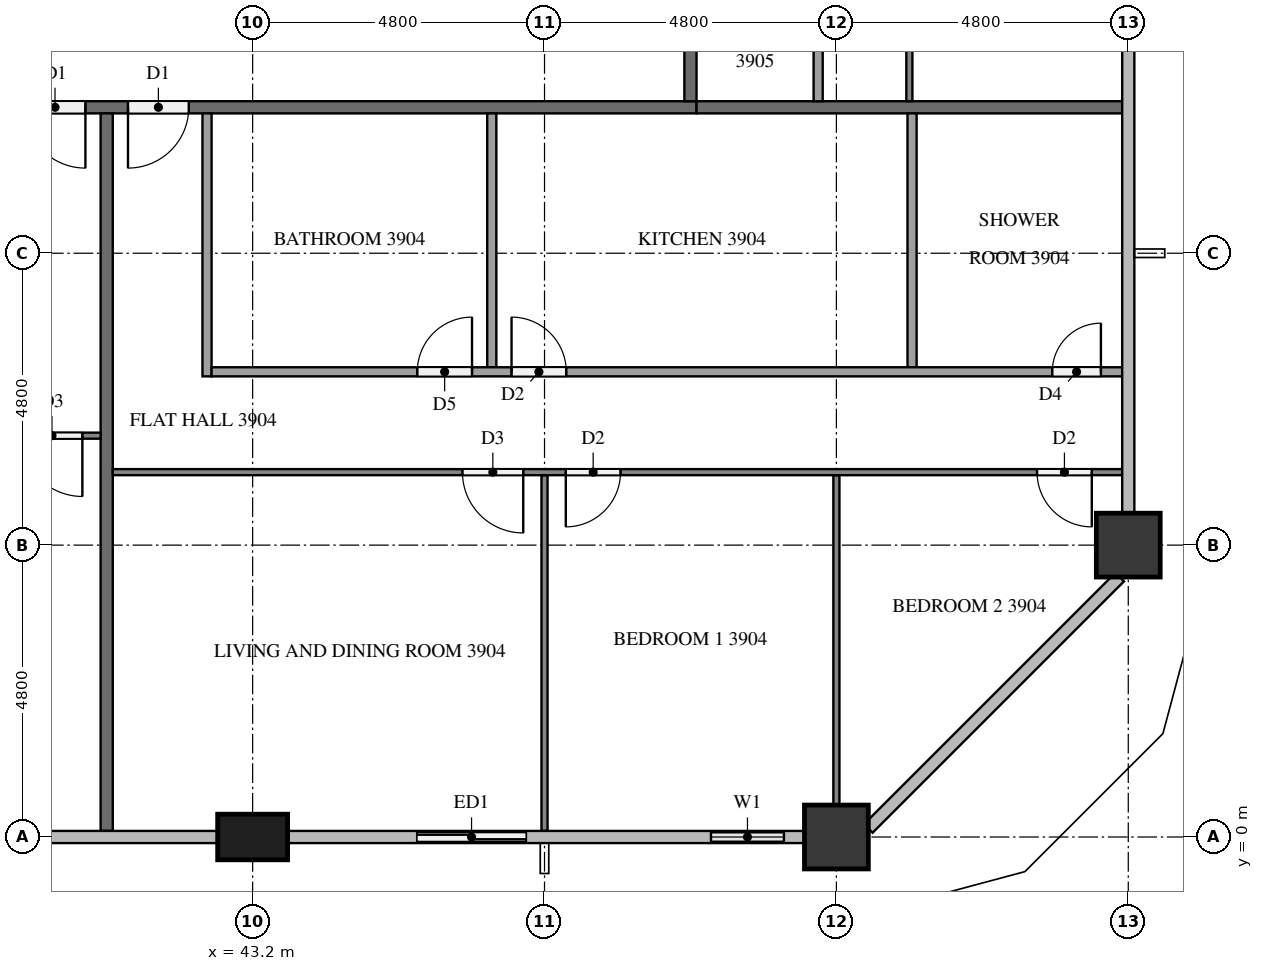
"""IFC4 building model, lengths in metres.
Left out: names, types, materials, properties, quantities, classifications, styles, units other than length and angle.
Written with IfcOpenShell. Run it as: python <this file> out.ifc"""

import sys

from ifc_helpers import new_model, si_unit, direction, frame, frame_2d, origin, origin_2d, place, context, subcontext, project, spatial, rectangle, extrude, element, fill, save


model = new_model("IFC4")
c1 = context("Model", 3, precision=1e-05, world=origin(), true_north=direction((0.0, 1.0)))
c2 = subcontext(c1, "Body", "Model", "MODEL_VIEW")
j1 = project(units=[si_unit("LENGTHUNIT", "METRE"), si_unit("PLANEANGLEUNIT", "RADIAN")], contexts=[c1])
p1 = place(None, origin())
s1 = spatial("IfcSite", under=j1, at=p1, CompositionType="ELEMENT")
p2 = place(p1, origin())
s2 = spatial("IfcBuilding", under=s1, at=p2, CompositionType="ELEMENT")
p3 = place(p2, frame((0.0, 0.0, 152.5)))
s3 = spatial("IfcBuildingStorey", under=s2, at=p3, CompositionType="ELEMENT", Elevation=152.5)
p4 = place(p3, frame((43.2, 0.0, 0.0), z_axis=(0.0, 0.0, 1.0), x_axis=(1.0, 0.0, 0.0)))
e1 = element("IfcColumn", 1, at=p4, inside=s3, PredefinedType="COLUMN", context=c2, shape_type="SweptSolid", body=[
    extrude(rectangle(XDim=1.15, YDim=0.75, at=origin_2d()), origin(), (0.0, 0.0, 1.0), 3.2),
])
for number, where, z_axis, x_axis in (
    (2, (52.8, 0.0, 0.0), (0.0, 0.0, 1.0), (1.0, 0.0, 0.0)),
    (3, (57.6, 4.8, 0.0), (0.0, 0.0, 1.0), (1.0, 0.0, 0.0)),
):
    element("IfcColumn", number, at=place(p3, frame(where, z_axis=z_axis, x_axis=x_axis)), inside=s3, PredefinedType="COLUMN", context=c2, shape_type="SweptSolid", body=[
        extrude(rectangle(XDim=1.05, YDim=1.05, at=origin_2d()), origin(), (0.0, 0.0, 1.0), 3.2),
    ])
p5 = place(p3, frame((45.6, 0.0, 0.0), z_axis=(0.0, 0.0, 1.0), x_axis=(1.0, 0.0, 0.0)))
e4 = element("IfcWall", 4, at=p5, inside=s3, PredefinedType="SOLIDWALL", context=c2, shape_type="SweptSolid", body=[
    extrude(rectangle(XDim=2.4, YDim=0.15, at=frame_2d((1.2, 0.0))), origin(), (0.0, 0.0, 1.0), 3.2),
])
p6 = place(p5, frame((0.3, 0.0, 0.0)))
e5 = element("IfcOpeningElement", 5, at=p6, cuts=e4, PredefinedType="OPENING", context=c2, shape_type="SweptSolid", body=[
    extrude(rectangle(XDim=1.8, YDim=2.4, at=frame_2d((0.9, 1.2))), frame((0.0, 0.085, 0.0), z_axis=(0.0, -1.0, 0.0), x_axis=(1.0, 0.0, 0.0)), (0.0, 0.0, 1.0), 0.17),
])
p7 = place(p3, frame((50.4, 0.0, 0.0), z_axis=(0.0, 0.0, 1.0), x_axis=(1.0, 0.0, 0.0)))
e6 = element("IfcWall", 6, at=p7, inside=s3, PredefinedType="SOLIDWALL", context=c2, shape_type="SweptSolid", body=[
    extrude(rectangle(XDim=1.875, YDim=0.15, at=frame_2d((0.938, 0.0))), origin(), (0.0, 0.0, 1.0), 3.2),
])
p8 = place(p7, frame((0.337, 0.0, 0.9)))
e7 = element("IfcOpeningElement", 7, at=p8, cuts=e6, PredefinedType="OPENING", context=c2, shape_type="SweptSolid", body=[
    extrude(rectangle(XDim=1.2, YDim=1.4, at=frame_2d((0.6, 0.7))), frame((0.0, 0.085, 0.0), z_axis=(0.0, -1.0, 0.0), x_axis=(1.0, 0.0, 0.0)), (0.0, 0.0, 1.0), 0.17),
])
p9 = place(p3, frame((50.5, 12.0, 0.0), z_axis=(0.0, 0.0, 1.0), x_axis=(-1.0, 0.0, 0.0)))
e8 = element("IfcWall", 8, at=p9, inside=s3, PredefinedType="PARTITIONING", context=c2, shape_type="SweptSolid", body=[
    extrude(rectangle(XDim=38.6, YDim=0.2, at=frame_2d((19.3, 0.0))), origin(), (0.0, 0.0, 1.0), 3.2),
])
p10 = place(p9, frame((36.45, 0.0, 0.0)))
e9 = element("IfcOpeningElement", 9, at=p10, cuts=e8, PredefinedType="OPENING", context=c2, shape_type="SweptSolid", body=[
    extrude(rectangle(XDim=1.0, YDim=2.1, at=frame_2d((0.5, 1.05))), frame((0.0, 0.11, 0.0), z_axis=(0.0, -1.0, 0.0), x_axis=(1.0, 0.0, 0.0)), (0.0, 0.0, 1.0), 0.22),
])
p11 = place(p9, frame((34.75, 0.0, 0.0)))
e10 = element("IfcOpeningElement", 10, at=p11, cuts=e8, PredefinedType="OPENING", context=c2, shape_type="SweptSolid", body=[
    extrude(rectangle(XDim=1.0, YDim=2.1, at=frame_2d((0.5, 1.05))), frame((0.0, 0.11, 0.0), z_axis=(0.0, -1.0, 0.0), x_axis=(1.0, 0.0, 0.0)), (0.0, 0.0, 1.0), 0.22),
])
p12 = place(p9, frame((10.05, 0.0, 0.0)))
e11 = element("IfcOpeningElement", 11, at=p12, cuts=e8, PredefinedType="OPENING", context=c2, shape_type="SweptSolid", body=[
    extrude(rectangle(XDim=1.0, YDim=2.1, at=frame_2d((0.5, 1.05))), frame((0.0, 0.11, 0.0), z_axis=(0.0, -1.0, 0.0), x_axis=(1.0, 0.0, 0.0)), (0.0, 0.0, 1.0), 0.22),
])
p13 = place(p9, frame((8.35, 0.0, 0.0)))
e12 = element("IfcOpeningElement", 12, at=p13, cuts=e8, PredefinedType="OPENING", context=c2, shape_type="SweptSolid", body=[
    extrude(rectangle(XDim=1.0, YDim=2.1, at=frame_2d((0.5, 1.05))), frame((0.0, 0.11, 0.0), z_axis=(0.0, -1.0, 0.0), x_axis=(1.0, 0.0, 0.0)), (0.0, 0.0, 1.0), 0.22),
])
p14 = place(p3, frame((50.4, 40.7, 0.0), z_axis=(0.0, 0.0, 1.0), x_axis=(0.0, -1.0, 0.0)))
e13 = element("IfcWall", 13, at=p14, inside=s3, PredefinedType="PARTITIONING", context=c2, shape_type="SweptSolid", body=[
    extrude(rectangle(XDim=28.6, YDim=0.2, at=frame_2d((14.3, 0.0))), origin(), (0.0, 0.0, 1.0), 3.2),
])
p15 = place(p14, frame((17.05, 0.0, 0.0)))
e14 = element("IfcOpeningElement", 14, at=p15, cuts=e13, PredefinedType="OPENING", context=c2, shape_type="SweptSolid", body=[
    extrude(rectangle(XDim=1.0, YDim=2.1, at=frame_2d((0.5, 1.05))), frame((0.0, 0.11, 0.0), z_axis=(0.0, -1.0, 0.0), x_axis=(1.0, 0.0, 0.0)), (0.0, 0.0, 1.0), 0.22),
])
p16 = place(p14, frame((15.35, 0.0, 0.0)))
e15 = element("IfcOpeningElement", 15, at=p16, cuts=e13, PredefinedType="OPENING", context=c2, shape_type="SweptSolid", body=[
    extrude(rectangle(XDim=1.0, YDim=2.1, at=frame_2d((0.5, 1.05))), frame((0.0, 0.11, 0.0), z_axis=(0.0, -1.0, 0.0), x_axis=(1.0, 0.0, 0.0)), (0.0, 0.0, 1.0), 0.22),
])
p17 = place(p14, frame((5.75, 0.0, 0.0)))
e16 = element("IfcOpeningElement", 16, at=p17, cuts=e13, PredefinedType="OPENING", context=c2, shape_type="SweptSolid", body=[
    extrude(rectangle(XDim=1.0, YDim=2.1, at=frame_2d((0.5, 1.05))), frame((0.0, 0.11, 0.0), z_axis=(0.0, -1.0, 0.0), x_axis=(1.0, 0.0, 0.0)), (0.0, 0.0, 1.0), 0.22),
])
p18 = place(p3, frame((40.8, 11.9, 0.0), z_axis=(0.0, 0.0, 1.0), x_axis=(0.0, -1.0, 0.0)))
e17 = element("IfcWall", 17, at=p18, inside=s3, PredefinedType="PARTITIONING", context=c2, shape_type="SweptSolid", body=[
    extrude(rectangle(XDim=11.8, YDim=0.2, at=frame_2d((5.9, 0.0))), origin(), (0.0, 0.0, 1.0), 3.2),
])
p19 = place(p3, frame((50.5, 12.0, 0.0), z_axis=(0.0, 0.0, 1.0), x_axis=(1.0, 0.0, 0.0)))
e18 = element("IfcWall", 18, at=p19, inside=s3, PredefinedType="PARTITIONING", context=c2, shape_type="SweptSolid", body=[
    extrude(rectangle(XDim=7.0, YDim=0.2, at=frame_2d((3.5, 0.0))), origin(), (0.0, 0.0, 1.0), 3.2),
])
p20 = place(p3, frame((40.7, 6.6, 0.0), z_axis=(0.0, 0.0, 1.0), x_axis=(-1.0, 0.0, 0.0)))
e19 = element("IfcWall", 19, at=p20, inside=s3, PredefinedType="PARTITIONING", context=c2, shape_type="SweptSolid", body=[
    extrude(rectangle(XDim=14.2, YDim=0.1, at=frame_2d((7.1, 0.0))), origin(), (0.0, 0.0, 1.0), 3.2),
])
p21 = place(p20, frame((0.3, 0.0, 0.0)))
e20 = element("IfcOpeningElement", 20, at=p21, cuts=e19, PredefinedType="OPENING", context=c2, shape_type="SweptSolid", body=[
    extrude(rectangle(XDim=1.0, YDim=2.1, at=frame_2d((0.5, 1.05))), frame((0.0, 0.06, 0.0), z_axis=(0.0, -1.0, 0.0), x_axis=(1.0, 0.0, 0.0)), (0.0, 0.0, 1.0), 0.12),
])
p22 = place(p20, frame((8.25, 0.0, 0.0)))
e21 = element("IfcOpeningElement", 21, at=p22, cuts=e19, PredefinedType="OPENING", context=c2, shape_type="SweptSolid", body=[
    extrude(rectangle(XDim=0.9, YDim=2.1, at=frame_2d((0.45, 1.05))), frame((0.0, 0.06, 0.0), z_axis=(0.0, -1.0, 0.0), x_axis=(1.0, 0.0, 0.0)), (0.0, 0.0, 1.0), 0.12),
])
p23 = place(p20, frame((9.85, 0.0, 0.0)))
e22 = element("IfcOpeningElement", 22, at=p23, cuts=e19, PredefinedType="OPENING", context=c2, shape_type="SweptSolid", body=[
    extrude(rectangle(XDim=0.9, YDim=2.1, at=frame_2d((0.45, 1.05))), frame((0.0, 0.06, 0.0), z_axis=(0.0, -1.0, 0.0), x_axis=(1.0, 0.0, 0.0)), (0.0, 0.0, 1.0), 0.12),
])
p24 = place(p3, frame((48.0, 5.95, 0.0), z_axis=(0.0, 0.0, 1.0), x_axis=(0.0, -1.0, 0.0)))
e23 = element("IfcWall", 23, at=p24, inside=s3, PredefinedType="PARTITIONING", context=c2, shape_type="SweptSolid", body=[
    extrude(rectangle(XDim=5.85, YDim=0.1, at=frame_2d((2.925, 0.0))), origin(), (0.0, 0.0, 1.0), 3.2),
])
p25 = place(p3, frame((52.8, 5.95, 0.0), z_axis=(0.0, 0.0, 1.0), x_axis=(0.0, -1.0, 0.0)))
e24 = element("IfcWall", 24, at=p25, inside=s3, PredefinedType="PARTITIONING", context=c2, shape_type="SweptSolid", body=[
    extrude(rectangle(XDim=5.425, YDim=0.1, at=frame_2d((2.712, 0.0))), origin(), (0.0, 0.0, 1.0), 3.2),
])
p26 = place(p3, frame((57.5, 6.0, 0.0), z_axis=(0.0, 0.0, 1.0), x_axis=(-1.0, 0.0, 0.0)))
e25 = element("IfcWall", 25, at=p26, inside=s3, PredefinedType="PARTITIONING", context=c2, shape_type="SweptSolid", body=[
    extrude(rectangle(XDim=16.6, YDim=0.1, at=frame_2d((8.3, 0.0))), origin(), (0.0, 0.0, 1.0), 3.2),
])
p27 = place(p26, frame((9.85, 0.0, 0.0)))
e26 = element("IfcOpeningElement", 26, at=p27, cuts=e25, PredefinedType="OPENING", context=c2, shape_type="SweptSolid", body=[
    extrude(rectangle(XDim=1.0, YDim=2.1, at=frame_2d((0.5, 1.05))), frame((0.0, 0.06, 0.0), z_axis=(0.0, -1.0, 0.0), x_axis=(1.0, 0.0, 0.0)), (0.0, 0.0, 1.0), 0.12),
])
p28 = place(p26, frame((8.25, 0.0, 0.0)))
e27 = element("IfcOpeningElement", 27, at=p28, cuts=e25, PredefinedType="OPENING", context=c2, shape_type="SweptSolid", body=[
    extrude(rectangle(XDim=0.9, YDim=2.1, at=frame_2d((0.45, 1.05))), frame((0.0, 0.06, 0.0), z_axis=(0.0, -1.0, 0.0), x_axis=(1.0, 0.0, 0.0)), (0.0, 0.0, 1.0), 0.12),
])
p29 = place(p26, frame((0.5, 0.0, 0.0)))
e28 = element("IfcOpeningElement", 28, at=p29, cuts=e25, PredefinedType="OPENING", context=c2, shape_type="SweptSolid", body=[
    extrude(rectangle(XDim=0.9, YDim=2.1, at=frame_2d((0.45, 1.05))), frame((0.0, 0.06, 0.0), z_axis=(0.0, -1.0, 0.0), x_axis=(1.0, 0.0, 0.0)), (0.0, 0.0, 1.0), 0.12),
])
for number, where, z_axis, x_axis in (
    (29, (47.133, 11.9, 0.0), (0.0, 0.0, 1.0), (0.0, -1.0, 0.0)),
    (30, (54.044, 11.9, 0.0), (0.0, 0.0, 1.0), (0.0, -1.0, 0.0)),
):
    element("IfcWall", number, at=place(p3, frame(where, z_axis=z_axis, x_axis=x_axis)), inside=s3, PredefinedType="PARTITIONING", context=c2, shape_type="SweptSolid", body=[
        extrude(rectangle(XDim=4.175, YDim=0.15, at=frame_2d((2.087, 0.0))), origin(), (0.0, 0.0, 1.0), 3.2),
    ])
p30 = place(p3, frame((42.45, 11.9, 0.0), z_axis=(0.0, 0.0, 1.0), x_axis=(0.0, -1.0, 0.0)))
e31 = element("IfcWall", 31, at=p30, inside=s3, PredefinedType="PARTITIONING", context=c2, shape_type="SweptSolid", body=[
    extrude(rectangle(XDim=4.325, YDim=0.15, at=frame_2d((2.163, 0.0))), origin(), (0.0, 0.0, 1.0), 3.2),
])
p31 = place(p3, frame((42.525, 7.65, 0.0), z_axis=(0.0, 0.0, 1.0), x_axis=(1.0, 0.0, 0.0)))
e32 = element("IfcWall", 32, at=p31, inside=s3, PredefinedType="PARTITIONING", context=c2, shape_type="SweptSolid", body=[
    extrude(rectangle(XDim=14.975, YDim=0.15, at=frame_2d((7.488, 0.0))), origin(), (0.0, 0.0, 1.0), 3.2),
])
p32 = place(p31, frame((3.383, 0.0, 0.0)))
e33 = element("IfcOpeningElement", 33, at=p32, cuts=e32, PredefinedType="OPENING", context=c2, shape_type="SweptSolid", body=[
    extrude(rectangle(XDim=0.9, YDim=2.1, at=frame_2d((0.45, 1.05))), frame((0.0, 0.085, 0.0), z_axis=(0.0, -1.0, 0.0), x_axis=(1.0, 0.0, 0.0)), (0.0, 0.0, 1.0), 0.17),
])
p33 = place(p31, frame((4.933, 0.0, 0.0)))
e34 = element("IfcOpeningElement", 34, at=p33, cuts=e32, PredefinedType="OPENING", context=c2, shape_type="SweptSolid", body=[
    extrude(rectangle(XDim=0.9, YDim=2.1, at=frame_2d((0.45, 1.05))), frame((0.0, 0.085, 0.0), z_axis=(0.0, -1.0, 0.0), x_axis=(1.0, 0.0, 0.0)), (0.0, 0.0, 1.0), 0.17),
])
p34 = place(p31, frame((13.825, 0.0, 0.0)))
e35 = element("IfcOpeningElement", 35, at=p34, cuts=e32, PredefinedType="OPENING", context=c2, shape_type="SweptSolid", body=[
    extrude(rectangle(XDim=0.8, YDim=2.1, at=frame_2d((0.4, 1.05))), frame((0.0, 0.085, 0.0), z_axis=(0.0, -1.0, 0.0), x_axis=(1.0, 0.0, 0.0)), (0.0, 0.0, 1.0), 0.17),
])
p35 = place(p3, frame((54.0, 23.9, 0.0), z_axis=(0.0, 0.0, 1.0), x_axis=(0.0, -1.0, 0.0)))
e36 = element("IfcWall", 36, at=p35, inside=s3, PredefinedType="PARTITIONING", context=c2, shape_type="SweptSolid", body=[
    extrude(rectangle(XDim=11.8, YDim=0.1, at=frame_2d((5.9, 0.0))), origin(), (0.0, 0.0, 1.0), 3.2),
])
p36 = place(p35, frame((3.45, 0.0, 0.0)))
e37 = element("IfcOpeningElement", 37, at=p36, cuts=e36, PredefinedType="OPENING", context=c2, shape_type="SweptSolid", body=[
    extrude(rectangle(XDim=0.9, YDim=2.1, at=frame_2d((0.45, 1.05))), frame((0.0, 0.06, 0.0), z_axis=(0.0, -1.0, 0.0), x_axis=(1.0, 0.0, 0.0)), (0.0, 0.0, 1.0), 0.12),
])
p37 = place(p35, frame((5.05, 0.0, 0.0)))
e38 = element("IfcOpeningElement", 38, at=p37, cuts=e36, PredefinedType="OPENING", context=c2, shape_type="SweptSolid", body=[
    extrude(rectangle(XDim=1.0, YDim=2.1, at=frame_2d((0.5, 1.05))), frame((0.0, 0.06, 0.0), z_axis=(0.0, -1.0, 0.0), x_axis=(1.0, 0.0, 0.0)), (0.0, 0.0, 1.0), 0.12),
])
p38 = place(p3, frame((52.5, 12.1, 0.0), z_axis=(0.0, 0.0, 1.0), x_axis=(0.0, 1.0, 0.0)))
e39 = element("IfcWall", 39, at=p38, inside=s3, PredefinedType="PARTITIONING", context=c2, shape_type="SweptSolid", body=[
    extrude(rectangle(XDim=10.175, YDim=0.15, at=frame_2d((5.087, 0.0))), origin(), (0.0, 0.0, 1.0), 3.2),
])
p39 = place(p38, frame((6.43, 0.0, 0.0)))
e40 = element("IfcOpeningElement", 40, at=p39, cuts=e39, PredefinedType="OPENING", context=c2, shape_type="SweptSolid", body=[
    extrude(rectangle(XDim=0.8, YDim=2.1, at=frame_2d((0.4, 1.05))), frame((0.0, 0.085, 0.0), z_axis=(0.0, -1.0, 0.0), x_axis=(1.0, 0.0, 0.0)), (0.0, 0.0, 1.0), 0.17),
])
p40 = place(p38, frame((4.88, 0.0, 0.0)))
e41 = element("IfcOpeningElement", 41, at=p40, cuts=e39, PredefinedType="OPENING", context=c2, shape_type="SweptSolid", body=[
    extrude(rectangle(XDim=0.9, YDim=2.1, at=frame_2d((0.45, 1.05))), frame((0.0, 0.085, 0.0), z_axis=(0.0, -1.0, 0.0), x_axis=(1.0, 0.0, 0.0)), (0.0, 0.0, 1.0), 0.17),
])
p41 = place(p6, origin())
e42 = element("IfcDoor", 42, at=p41, inside=s3, OperationType="SLIDING_TO_RIGHT", PredefinedType="DOOR", context=c2, shape_type="SweptSolid", body=[
    extrude(rectangle(XDim=1.8, YDim=2.4, at=frame_2d((0.9, 1.2))), frame((0.0, 0.025, 0.0), z_axis=(0.0, -1.0, 0.0), x_axis=(1.0, 0.0, 0.0)), (0.0, 0.0, 1.0), 0.05),
])
fill(e5, e42)
p42 = place(p8, origin())
e43 = element("IfcWindow", 43, at=p42, inside=s3, PartitioningType="SINGLE_PANEL", PredefinedType="WINDOW", context=c2, shape_type="SweptSolid", body=[
    extrude(rectangle(XDim=1.2, YDim=1.4, at=frame_2d((0.6, 0.7))), frame((0.0, 0.03, 0.0), z_axis=(0.0, -1.0, 0.0), x_axis=(1.0, 0.0, 0.0)), (0.0, 0.0, 1.0), 0.06),
])
fill(e7, e43)
p43 = place(p12, origin())
e44 = element("IfcDoor", 44, at=p43, inside=s3, OperationType="SINGLE_SWING_LEFT", PredefinedType="DOOR", context=c2, shape_type="SweptSolid", body=[
    extrude(rectangle(XDim=1.0, YDim=2.1, at=frame_2d((0.5, 1.05))), frame((0.0, 0.025, 0.0), z_axis=(0.0, -1.0, 0.0), x_axis=(1.0, 0.0, 0.0)), (0.0, 0.0, 1.0), 0.05),
])
fill(e11, e44)
p44 = place(p13, origin())
e45 = element("IfcDoor", 45, at=p44, inside=s3, OperationType="SINGLE_SWING_RIGHT", PredefinedType="DOOR", context=c2, shape_type="SweptSolid", body=[
    extrude(rectangle(XDim=1.0, YDim=2.1, at=frame_2d((0.5, 1.05))), frame((0.0, 0.025, 0.0), z_axis=(0.0, -1.0, 0.0), x_axis=(1.0, 0.0, 0.0)), (0.0, 0.0, 1.0), 0.05),
])
fill(e12, e45)
p45 = place(p21, origin())
e46 = element("IfcDoor", 46, at=p45, inside=s3, OperationType="SINGLE_SWING_LEFT", PredefinedType="DOOR", context=c2, shape_type="SweptSolid", body=[
    extrude(rectangle(XDim=1.0, YDim=2.1, at=frame_2d((0.5, 1.05))), frame((0.0, 0.025, 0.0), z_axis=(0.0, -1.0, 0.0), x_axis=(1.0, 0.0, 0.0)), (0.0, 0.0, 1.0), 0.05),
])
fill(e20, e46)
p46 = place(p27, origin())
e47 = element("IfcDoor", 47, at=p46, inside=s3, OperationType="SINGLE_SWING_LEFT", PredefinedType="DOOR", context=c2, shape_type="SweptSolid", body=[
    extrude(rectangle(XDim=1.0, YDim=2.1, at=frame_2d((0.5, 1.05))), frame((0.0, 0.025, 0.0), z_axis=(0.0, -1.0, 0.0), x_axis=(1.0, 0.0, 0.0)), (0.0, 0.0, 1.0), 0.05),
])
fill(e26, e47)
p47 = place(p28, origin())
e48 = element("IfcDoor", 48, at=p47, inside=s3, OperationType="SINGLE_SWING_RIGHT", PredefinedType="DOOR", context=c2, shape_type="SweptSolid", body=[
    extrude(rectangle(XDim=0.9, YDim=2.1, at=frame_2d((0.45, 1.05))), frame((0.0, 0.025, 0.0), z_axis=(0.0, -1.0, 0.0), x_axis=(1.0, 0.0, 0.0)), (0.0, 0.0, 1.0), 0.05),
])
fill(e27, e48)
p48 = place(p29, origin())
e49 = element("IfcDoor", 49, at=p48, inside=s3, OperationType="SINGLE_SWING_LEFT", PredefinedType="DOOR", context=c2, shape_type="SweptSolid", body=[
    extrude(rectangle(XDim=0.9, YDim=2.1, at=frame_2d((0.45, 1.05))), frame((0.0, 0.025, 0.0), z_axis=(0.0, -1.0, 0.0), x_axis=(1.0, 0.0, 0.0)), (0.0, 0.0, 1.0), 0.05),
])
fill(e28, e49)
p49 = place(p32, origin())
e50 = element("IfcDoor", 50, at=p49, inside=s3, OperationType="SINGLE_SWING_RIGHT", PredefinedType="DOOR", context=c2, shape_type="SweptSolid", body=[
    extrude(rectangle(XDim=0.9, YDim=2.1, at=frame_2d((0.45, 1.05))), frame((0.0, 0.025, 0.0), z_axis=(0.0, -1.0, 0.0), x_axis=(1.0, 0.0, 0.0)), (0.0, 0.0, 1.0), 0.05),
])
fill(e33, e50)
p50 = place(p33, origin())
e51 = element("IfcDoor", 51, at=p50, inside=s3, OperationType="SINGLE_SWING_LEFT", PredefinedType="DOOR", context=c2, shape_type="SweptSolid", body=[
    extrude(rectangle(XDim=0.9, YDim=2.1, at=frame_2d((0.45, 1.05))), frame((0.0, 0.025, 0.0), z_axis=(0.0, -1.0, 0.0), x_axis=(1.0, 0.0, 0.0)), (0.0, 0.0, 1.0), 0.05),
])
fill(e34, e51)
p51 = place(p34, origin())
e52 = element("IfcDoor", 52, at=p51, inside=s3, OperationType="SINGLE_SWING_RIGHT", PredefinedType="DOOR", context=c2, shape_type="SweptSolid", body=[
    extrude(rectangle(XDim=0.8, YDim=2.1, at=frame_2d((0.4, 1.05))), frame((0.0, 0.025, 0.0), z_axis=(0.0, -1.0, 0.0), x_axis=(1.0, 0.0, 0.0)), (0.0, 0.0, 1.0), 0.05),
])
fill(e35, e52)
save(model, sys.argv[1])
